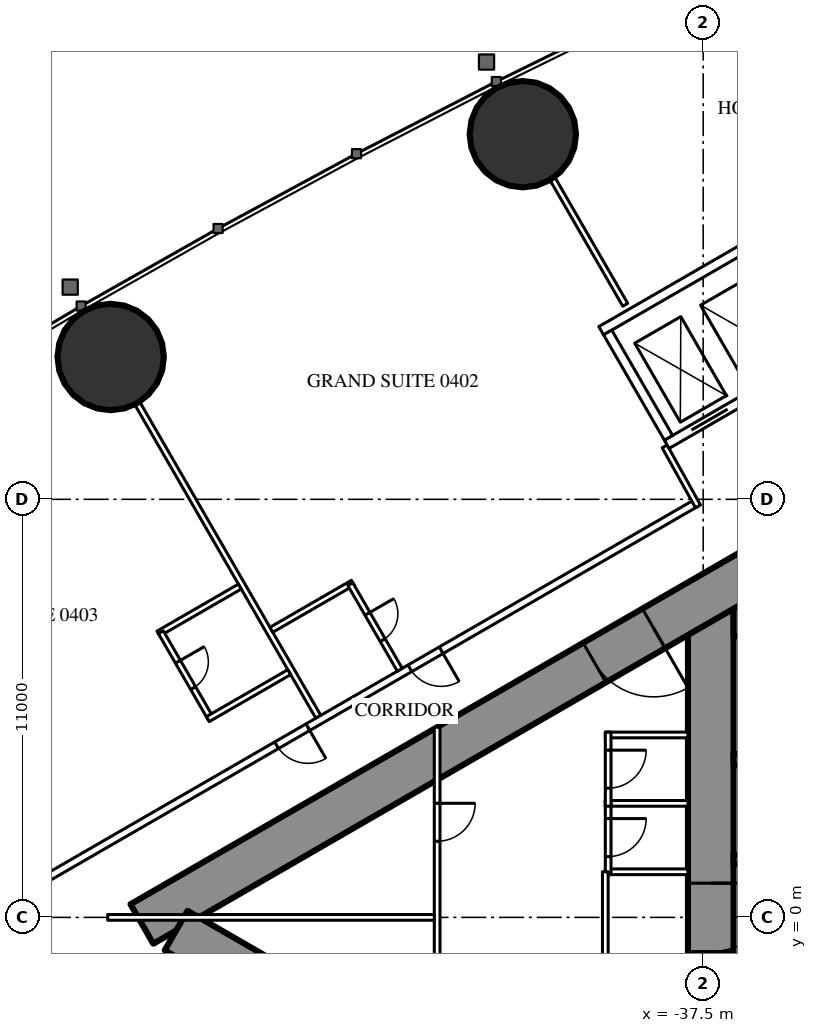
"""IFC4 building model, lengths in metres.
Left out: names, types, materials, properties, quantities, classifications, styles, units other than length and angle.
Written with IfcOpenShell. Run it as: python <this file> out.ifc"""

import sys

from ifc_helpers import new_model, si_unit, direction, frame, frame_2d, origin, origin_2d, place, context, subcontext, project, spatial, rectangle, hollow_circle, extrude, element, fill, save


model = new_model("IFC4")
c1 = context("Model", 3, precision=1e-05, world=origin(), true_north=direction((0.0, 1.0)))
c2 = subcontext(c1, "Body", "Model", "MODEL_VIEW")
j1 = project(units=[si_unit("LENGTHUNIT", "METRE"), si_unit("PLANEANGLEUNIT", "RADIAN")], contexts=[c1])
p1 = place(None, origin())
s1 = spatial("IfcSite", under=j1, at=p1, CompositionType="ELEMENT")
p2 = place(p1, origin())
s2 = spatial("IfcBuilding", under=s1, at=p2, CompositionType="ELEMENT")
p3 = place(p2, frame((0.0, 0.0, 21.5)))
s3 = spatial("IfcBuildingStorey", under=s2, at=p3, CompositionType="ELEMENT", Elevation=21.5)
for number, where, z_axis, x_axis in (
    (1, (-42.245, 20.607, 0.0), (0.0, 0.0, 1.0), (1.0, 0.0, 0.0)),
    (2, (-53.09, 14.745, 0.0), (0.0, 0.0, 1.0), (1.0, 0.0, 0.0)),
):
    element("IfcColumn", number, at=place(p3, frame(where, z_axis=z_axis, x_axis=x_axis)), inside=s3, PredefinedType="COLUMN", context=c2, shape_type="SweptSolid", body=[
        extrude(hollow_circle(Radius=1.4, WallThickness=0.12, at=origin_2d()), origin(), (0.0, 0.0, 1.0), 3.5),
    ])
p4 = place(p3, frame((-37.3, 8.6, 0.0), z_axis=(0.0, 0.0, 1.0), x_axis=(0.0, -1.0, 0.0)))
e3 = element("IfcWall", 3, at=p4, inside=s3, PredefinedType="SHEAR", context=c2, shape_type="SweptSolid", body=[
    extrude(rectangle(XDim=17.2, YDim=1.2, at=frame_2d((8.6, 0.0))), origin(), (0.0, 0.0, 1.0), 3.5),
])
p5 = place(p4, frame((7.7, 0.0, 0.0)))
e4 = element("IfcOpeningElement", 4, at=p5, cuts=e3, PredefinedType="OPENING", context=c2, shape_type="SweptSolid", body=[
    extrude(rectangle(XDim=1.8, YDim=2.2, at=frame_2d((0.9, 1.1))), frame((0.0, 0.61, 0.0), z_axis=(0.0, -1.0, 0.0), x_axis=(1.0, 0.0, 0.0)), (0.0, 0.0, 1.0), 1.22),
])
p6 = place(p3, frame((-28.3, 8.0, 0.0), z_axis=(0.0, 0.0, 1.0), x_axis=(-1.0, 0.0, 0.0)))
e5 = element("IfcWall", 5, at=p6, inside=s3, PredefinedType="SHEAR", context=c2, shape_type="SweptSolid", body=[
    extrude(rectangle(XDim=8.4, YDim=1.2, at=frame_2d((4.2, 0.0))), origin(), (0.0, 0.0, 1.0), 3.5),
])
p7 = place(p6, frame((0.25, 0.0, 0.0)))
e6 = element("IfcOpeningElement", 6, at=p7, cuts=e5, PredefinedType="OPENING", context=c2, shape_type="SweptSolid", body=[
    extrude(rectangle(XDim=1.0, YDim=2.2, at=frame_2d((0.5, 1.1))), frame((0.0, 0.61, 0.0), z_axis=(0.0, -1.0, 0.0), x_axis=(1.0, 0.0, 0.0)), (0.0, 0.0, 1.0), 1.22),
])
p8 = place(p3, frame((-28.3, 4.15, 0.0), z_axis=(0.0, 0.0, 1.0), x_axis=(-1.0, 0.0, 0.0)))
e7 = element("IfcWall", 7, at=p8, inside=s3, PredefinedType="SHEAR", context=c2, shape_type="SweptSolid", body=[
    extrude(rectangle(XDim=8.4, YDim=0.3, at=frame_2d((4.2, 0.0))), origin(), (0.0, 0.0, 1.0), 3.5),
])
p9 = place(p3, frame((-34.25, 1.525, 0.0), z_axis=(0.0, 0.0, 1.0), x_axis=(-1.0, 0.0, 0.0)))
e8 = element("IfcWall", 8, at=p9, inside=s3, PredefinedType="SHEAR", context=c2, shape_type="SweptSolid", body=[
    extrude(rectangle(XDim=2.45, YDim=0.25, at=frame_2d((1.225, 0.0))), origin(), (0.0, 0.0, 1.0), 3.5),
])
p10 = place(p3, frame((-27.2, 14.3, 0.0), z_axis=(0.0, 0.0, 1.0), x_axis=(-0.866026593062, -0.499997940104, 0.0)))
e9 = element("IfcWall", 9, at=p10, inside=s3, PredefinedType="SHEAR", context=c2, shape_type="SweptSolid", body=[
    extrude(rectangle(XDim=28.946, YDim=1.2, at=frame_2d((14.473, 0.0))), origin(), (0.0, 0.0, 1.0), 3.5),
])
p11 = place(p10, frame((4.6, 0.0, 0.0)))
e10 = element("IfcOpeningElement", 10, at=p11, cuts=e9, PredefinedType="OPENING", context=c2, shape_type="SweptSolid", body=[
    extrude(rectangle(XDim=1.0, YDim=2.2, at=frame_2d((0.5, 1.1))), frame((0.0, 0.61, 0.0), z_axis=(0.0, -1.0, 0.0), x_axis=(1.0, 0.0, 0.0)), (0.0, 0.0, 1.0), 1.22),
])
p12 = place(p10, frame((13.395, 0.0, 0.0)))
e11 = element("IfcOpeningElement", 11, at=p12, cuts=e9, PredefinedType="OPENING", context=c2, shape_type="SweptSolid", body=[
    extrude(rectangle(XDim=1.8, YDim=2.2, at=frame_2d((0.9, 1.1))), frame((0.0, 0.61, 0.0), z_axis=(0.0, -1.0, 0.0), x_axis=(1.0, 0.0, 0.0)), (0.0, 0.0, 1.0), 1.22),
])
p13 = place(p3, frame((-27.2, -14.3, 0.0), z_axis=(0.0, 0.0, 1.0), x_axis=(-0.866024021859, 0.500002393557, 0.0)))
e12 = element("IfcWall", 12, at=p13, inside=s3, PredefinedType="SHEAR", context=c2, shape_type="SweptSolid", body=[
    extrude(rectangle(XDim=27.907, YDim=1.2, at=frame_2d((13.954, 0.0))), origin(), (0.0, 0.0, 1.0), 3.5),
])
p14 = place(p13, frame((4.6, 0.0, 0.0)))
e13 = element("IfcOpeningElement", 13, at=p14, cuts=e12, PredefinedType="OPENING", context=c2, shape_type="SweptSolid", body=[
    extrude(rectangle(XDim=1.0, YDim=2.2, at=frame_2d((0.5, 1.1))), frame((0.0, 0.61, 0.0), z_axis=(0.0, -1.0, 0.0), x_axis=(1.0, 0.0, 0.0)), (0.0, 0.0, 1.0), 1.22),
])
p15 = place(p13, frame((13.395, 0.0, 0.0)))
e14 = element("IfcOpeningElement", 14, at=p15, cuts=e12, PredefinedType="OPENING", context=c2, shape_type="SweptSolid", body=[
    extrude(rectangle(XDim=1.8, YDim=2.2, at=frame_2d((0.9, 1.1))), frame((0.0, 0.61, 0.0), z_axis=(0.0, -1.0, 0.0), x_axis=(1.0, 0.0, 0.0)), (0.0, 0.0, 1.0), 1.22),
])
p16 = place(p3, frame((-47.627, 5.278, 0.0), z_axis=(0.0, 0.0, 1.0), x_axis=(-0.500009844318, 0.86601972009, 0.0)))
e15 = element("IfcWall", 15, at=p16, inside=s3, PredefinedType="PARTITIONING", context=c2, shape_type="SweptSolid", body=[
    extrude(rectangle(XDim=9.51, YDim=0.15, at=frame_2d((4.755, 0.0))), origin(), (0.0, 0.0, 1.0), 2.25),
])
p17 = place(p3, frame((-39.551, 16.119, 0.0), z_axis=(0.0, 0.0, 1.0), x_axis=(-0.500014214979, 0.866017196607, 0.0)))
e16 = element("IfcWall", 16, at=p17, inside=s3, PredefinedType="PARTITIONING", context=c2, shape_type="SweptSolid", body=[
    extrude(rectangle(XDim=3.815, YDim=0.15, at=frame_2d((1.907, 0.0))), origin(), (0.0, 0.0, 1.0), 3.25),
])
p18 = place(p3, frame((-37.7, 10.894, 0.0), z_axis=(0.0, 0.0, 1.0), x_axis=(-0.866027905338, -0.499995667157, 0.0)))
e17 = element("IfcWall", 17, at=p18, inside=s3, PredefinedType="PARTITIONING", context=c2, shape_type="SweptSolid", body=[
    extrude(rectangle(XDim=21.787, YDim=0.2, at=frame_2d((10.894, 0.0))), origin(), (0.0, 0.0, 1.0), 3.25),
])
p19 = place(p18, frame((11.78, 0.0, 0.0)))
e18 = element("IfcOpeningElement", 18, at=p19, cuts=e17, PredefinedType="OPENING", context=c2, shape_type="SweptSolid", body=[
    extrude(rectangle(XDim=0.95, YDim=2.2, at=frame_2d((0.475, 1.1))), frame((0.0, 0.11, 0.0), z_axis=(0.0, -1.0, 0.0), x_axis=(1.0, 0.0, 0.0)), (0.0, 0.0, 1.0), 0.22),
])
p20 = place(p18, frame((7.73, 0.0, 0.0)))
e19 = element("IfcOpeningElement", 19, at=p20, cuts=e17, PredefinedType="OPENING", context=c2, shape_type="SweptSolid", body=[
    extrude(rectangle(XDim=0.95, YDim=2.2, at=frame_2d((0.475, 1.1))), frame((0.0, 0.11, 0.0), z_axis=(0.0, -1.0, 0.0), x_axis=(1.0, 0.0, 0.0)), (0.0, 0.0, 1.0), 0.22),
])
p21 = place(p3, frame((-36.92, -11.344, 0.0), z_axis=(0.0, 0.0, 1.0), x_axis=(-0.866028313256, 0.499994960614, 0.0)))
e20 = element("IfcWall", 20, at=p21, inside=s3, PredefinedType="PARTITIONING", context=c2, shape_type="SweptSolid", body=[
    extrude(rectangle(XDim=22.568, YDim=0.2, at=frame_2d((11.284, 0.0))), origin(), (0.0, 0.0, 1.0), 3.25),
])
p22 = place(p21, frame((15.03, 0.0, 0.0)))
e21 = element("IfcOpeningElement", 21, at=p22, cuts=e20, PredefinedType="OPENING", context=c2, shape_type="SweptSolid", body=[
    extrude(rectangle(XDim=0.95, YDim=2.2, at=frame_2d((0.475, 1.1))), frame((0.0, 0.11, 0.0), z_axis=(0.0, -1.0, 0.0), x_axis=(1.0, 0.0, 0.0)), (0.0, 0.0, 1.0), 0.22),
])
p23 = place(p21, frame((3.35, 0.0, 0.0)))
e22 = element("IfcOpeningElement", 22, at=p23, cuts=e20, PredefinedType="OPENING", context=c2, shape_type="SweptSolid", body=[
    extrude(rectangle(XDim=1.0, YDim=2.2, at=frame_2d((0.5, 1.1))), frame((0.0, 0.11, 0.0), z_axis=(0.0, -1.0, 0.0), x_axis=(1.0, 0.0, 0.0)), (0.0, 0.0, 1.0), 0.22),
])
p24 = place(p3, frame((-38.513, 12.392, 0.0), z_axis=(0.0, 0.0, 1.0), x_axis=(0.485585508183, -0.874189175317, 0.0)))
e23 = element("IfcWall", 23, at=p24, inside=s3, PredefinedType="PARTITIONING", context=c2, shape_type="SweptSolid", body=[
    extrude(rectangle(XDim=1.805, YDim=0.15, at=frame_2d((0.902, 0.0))), origin(), (0.0, 0.0, 1.0), 3.25),
])
p25 = place(p3, frame((-49.692, 8.704, 0.0), z_axis=(0.0, 0.0, 1.0), x_axis=(-0.866073894602, -0.499916002032, 0.0)))
e24 = element("IfcWall", 24, at=p25, inside=s3, PredefinedType="PARTITIONING", context=c2, shape_type="SweptSolid", body=[
    extrude(rectangle(XDim=2.475, YDim=0.15, at=frame_2d((1.238, 0.0))), origin(), (0.0, 0.0, 1.0), 3.25),
])
p26 = place(p3, frame((-50.47, 5.253, 0.0), z_axis=(0.0, 0.0, 1.0), x_axis=(-0.500006934395, 0.866021400173, 0.0)))
e25 = element("IfcWall", 25, at=p26, inside=s3, PredefinedType="PARTITIONING", context=c2, shape_type="SweptSolid", body=[
    extrude(rectangle(XDim=2.6, YDim=0.15, at=frame_2d((1.3, 0.0))), origin(), (0.0, 0.0, 1.0), 3.25),
])
p27 = place(p26, frame((0.9, 0.0, 0.0)))
e26 = element("IfcOpeningElement", 26, at=p27, cuts=e25, PredefinedType="OPENING", context=c2, shape_type="SweptSolid", body=[
    extrude(rectangle(XDim=0.8, YDim=2.2, at=frame_2d((0.4, 1.1))), frame((0.0, 0.085, 0.0), z_axis=(0.0, -1.0, 0.0), x_axis=(1.0, 0.0, 0.0)), (0.0, 0.0, 1.0), 0.17),
])
for number, where, z_axis, x_axis in (
    (27, (-48.392, 6.453, 0.0), (0.0, 0.0, 1.0), (-0.866, -0.5, 0.0)),
    (28, (-46.719, 8.804, 0.0), (0.0, 0.0, 1.0), (-0.866, -0.5, 0.0)),
):
    element("IfcWall", number, at=place(p3, frame(where, z_axis=z_axis, x_axis=x_axis)), inside=s3, PredefinedType="PARTITIONING", context=c2, shape_type="SweptSolid", body=[
        extrude(rectangle(XDim=2.475, YDim=0.15, at=frame_2d((1.237, 0.0))), origin(), (0.0, 0.0, 1.0), 3.25),
    ])
p28 = place(p3, frame((-45.483, 6.515, 0.0), z_axis=(0.0, 0.0, 1.0), x_axis=(-0.500006934395, 0.866021400173, 0.0)))
e29 = element("IfcWall", 29, at=p28, inside=s3, PredefinedType="PARTITIONING", context=c2, shape_type="SweptSolid", body=[
    extrude(rectangle(XDim=2.6, YDim=0.15, at=frame_2d((1.3, 0.0))), origin(), (0.0, 0.0, 1.0), 3.25),
])
p29 = place(p28, frame((0.9, 0.0, 0.0)))
e30 = element("IfcOpeningElement", 30, at=p29, cuts=e29, PredefinedType="OPENING", context=c2, shape_type="SweptSolid", body=[
    extrude(rectangle(XDim=0.8, YDim=2.2, at=frame_2d((0.4, 1.1))), frame((0.0, 0.085, 0.0), z_axis=(0.0, -1.0, 0.0), x_axis=(1.0, 0.0, 0.0)), (0.0, 0.0, 1.0), 0.17),
])
for number, where, z_axis, x_axis in (
    (31, (-37.9, 1.2, 0.0), (0.0, 0.0, 1.0), (-1.0, 0.0, 0.0)),
    (32, (-37.9, 3.0, 0.0), (0.0, 0.0, 1.0), (-1.0, 0.0, 0.0)),
    (33, (-37.9, 4.8, 0.0), (0.0, 0.0, 1.0), (-1.0, 0.0, 0.0)),
):
    element("IfcWall", number, at=place(p3, frame(where, z_axis=z_axis, x_axis=x_axis)), inside=s3, PredefinedType="PARTITIONING", context=c2, shape_type="SweptSolid", body=[
        extrude(rectangle(XDim=2.175, YDim=0.15, at=frame_2d((1.087, 0.0))), origin(), (0.0, 0.0, 1.0), 3.25),
    ])
p30 = place(p3, frame((-40.0, 3.075, 0.0), z_axis=(0.0, 0.0, 1.0), x_axis=(0.0, -1.0, 0.0)))
e34 = element("IfcWall", 34, at=p30, inside=s3, PredefinedType="PARTITIONING", context=c2, shape_type="SweptSolid", body=[
    extrude(rectangle(XDim=1.95, YDim=0.15, at=frame_2d((0.975, 0.0))), origin(), (0.0, 0.0, 1.0), 3.25),
])
p31 = place(p30, frame((0.475, 0.0, 0.0)))
e35 = element("IfcOpeningElement", 35, at=p31, cuts=e34, PredefinedType="OPENING", context=c2, shape_type="SweptSolid", body=[
    extrude(rectangle(XDim=1.0, YDim=2.2, at=frame_2d((0.5, 1.1))), frame((0.0, 0.085, 0.0), z_axis=(0.0, -1.0, 0.0), x_axis=(1.0, 0.0, 0.0)), (0.0, 0.0, 1.0), 0.17),
])
p32 = place(p3, frame((-40.0, 4.875, 0.0), z_axis=(0.0, 0.0, 1.0), x_axis=(0.0, -1.0, 0.0)))
e36 = element("IfcWall", 36, at=p32, inside=s3, PredefinedType="PARTITIONING", context=c2, shape_type="SweptSolid", body=[
    extrude(rectangle(XDim=1.95, YDim=0.15, at=frame_2d((0.975, 0.0))), origin(), (0.0, 0.0, 1.0), 3.25),
])
p33 = place(p32, frame((0.475, 0.0, 0.0)))
e37 = element("IfcOpeningElement", 37, at=p33, cuts=e36, PredefinedType="OPENING", context=c2, shape_type="SweptSolid", body=[
    extrude(rectangle(XDim=1.0, YDim=2.2, at=frame_2d((0.5, 1.1))), frame((0.0, 0.085, 0.0), z_axis=(0.0, -1.0, 0.0), x_axis=(1.0, 0.0, 0.0)), (0.0, 0.0, 1.0), 0.17),
])
p34 = place(p3, frame((-40.075, 1.2, 0.0), z_axis=(0.0, 0.0, 1.0), x_axis=(0.0, -1.0, 0.0)))
e38 = element("IfcWall", 38, at=p34, inside=s3, PredefinedType="PARTITIONING", context=c2, shape_type="SweptSolid", body=[
    extrude(rectangle(XDim=7.374, YDim=0.15, at=frame_2d((3.687, 0.0))), origin(), (0.0, 0.0, 1.0), 3.25),
])
p35 = place(p34, frame((2.787, 0.0, 0.0)))
e39 = element("IfcOpeningElement", 39, at=p35, cuts=e38, PredefinedType="OPENING", context=c2, shape_type="SweptSolid", body=[
    extrude(rectangle(XDim=1.8, YDim=2.2, at=frame_2d((0.9, 1.1))), frame((0.0, 0.085, 0.0), z_axis=(0.0, -1.0, 0.0), x_axis=(1.0, 0.0, 0.0)), (0.0, 0.0, 1.0), 0.17),
])
p36 = place(p3, frame((-44.5, 5.005, 0.0), z_axis=(0.0, 0.0, 1.0), x_axis=(0.0, -1.0, 0.0)))
e40 = element("IfcWall", 40, at=p36, inside=s3, PredefinedType="PARTITIONING", context=c2, shape_type="SweptSolid", body=[
    extrude(rectangle(XDim=10.009, YDim=0.15, at=frame_2d((5.005, 0.0))), origin(), (0.0, 0.0, 1.0), 2.45),
])
p37 = place(p36, frame((2.002, 0.0, 0.0)))
e41 = element("IfcOpeningElement", 41, at=p37, cuts=e40, PredefinedType="OPENING", context=c2, shape_type="SweptSolid", body=[
    extrude(rectangle(XDim=1.0, YDim=2.2, at=frame_2d((0.5, 1.1))), frame((0.0, 0.085, 0.0), z_axis=(0.0, -1.0, 0.0), x_axis=(1.0, 0.0, 0.0)), (0.0, 0.0, 1.0), 0.17),
])
p38 = place(p36, frame((7.007, 0.0, 0.0)))
e42 = element("IfcOpeningElement", 42, at=p38, cuts=e40, PredefinedType="OPENING", context=c2, shape_type="SweptSolid", body=[
    extrude(rectangle(XDim=1.0, YDim=2.2, at=frame_2d((0.5, 1.1))), frame((0.0, 0.085, 0.0), z_axis=(0.0, -1.0, 0.0), x_axis=(1.0, 0.0, 0.0)), (0.0, 0.0, 1.0), 0.17),
])
p39 = place(p3, frame((-44.575, 0.0, 0.0), z_axis=(0.0, 0.0, 1.0), x_axis=(-1.0, 0.0, 0.0)))
e43 = element("IfcWall", 43, at=p39, inside=s3, PredefinedType="PARTITIONING", context=c2, shape_type="SweptSolid", body=[
    extrude(rectangle(XDim=8.593, YDim=0.15, at=frame_2d((4.297, 0.0))), origin(), (0.0, 0.0, 1.0), 2.25),
])
p40 = place(p3, frame((-31.01, 16.747, 0.0), z_axis=(0.0, 0.0, 1.0), x_axis=(-0.866028165386, -0.499995216735, 0.0)))
e44 = element("IfcWall", 44, at=p40, inside=s3, PredefinedType="PARTITIONING", context=c2, shape_type="SweptSolid", body=[
    extrude(rectangle(XDim=8.6, YDim=0.25, at=frame_2d((4.3, 0.0))), origin(), (0.0, 0.0, 1.0), 3.25),
])
p41 = place(p40, frame((0.75, 0.0, 0.0)))
e45 = element("IfcOpeningElement", 45, at=p41, cuts=e44, PredefinedType="OPENING", context=c2, shape_type="SweptSolid", body=[
    extrude(rectangle(XDim=1.1, YDim=2.2, at=frame_2d((0.55, 1.1))), frame((0.0, 0.135, 0.0), z_axis=(0.0, -1.0, 0.0), x_axis=(1.0, 0.0, 0.0)), (0.0, 0.0, 1.0), 0.27),
])
p42 = place(p40, frame((2.75, 0.0, 0.0)))
e46 = element("IfcOpeningElement", 46, at=p42, cuts=e44, PredefinedType="OPENING", context=c2, shape_type="SweptSolid", body=[
    extrude(rectangle(XDim=1.1, YDim=2.2, at=frame_2d((0.55, 1.1))), frame((0.0, 0.135, 0.0), z_axis=(0.0, -1.0, 0.0), x_axis=(1.0, 0.0, 0.0)), (0.0, 0.0, 1.0), 0.27),
])
p43 = place(p40, frame((4.75, 0.0, 0.0)))
e47 = element("IfcOpeningElement", 47, at=p43, cuts=e44, PredefinedType="OPENING", context=c2, shape_type="SweptSolid", body=[
    extrude(rectangle(XDim=1.1, YDim=2.2, at=frame_2d((0.55, 1.1))), frame((0.0, 0.135, 0.0), z_axis=(0.0, -1.0, 0.0), x_axis=(1.0, 0.0, 0.0)), (0.0, 0.0, 1.0), 0.27),
])
p44 = place(p40, frame((6.75, 0.0, 0.0)))
e48 = element("IfcOpeningElement", 48, at=p44, cuts=e44, PredefinedType="OPENING", context=c2, shape_type="SweptSolid", body=[
    extrude(rectangle(XDim=1.1, YDim=2.2, at=frame_2d((0.55, 1.1))), frame((0.0, 0.135, 0.0), z_axis=(0.0, -1.0, 0.0), x_axis=(1.0, 0.0, 0.0)), (0.0, 0.0, 1.0), 0.27),
])
p45 = place(p3, frame((-32.736, 19.736, 0.0), z_axis=(0.0, 0.0, 1.0), x_axis=(-0.866028165386, -0.499995216735, 0.0)))
e49 = element("IfcWall", 49, at=p45, inside=s3, PredefinedType="PARTITIONING", context=c2, shape_type="SweptSolid", body=[
    extrude(rectangle(XDim=8.6, YDim=0.25, at=frame_2d((4.3, 0.0))), origin(), (0.0, 0.0, 1.0), 3.25),
])
p46 = place(p3, frame((-38.413, 12.618, 0.0), z_axis=(0.0, 0.0, 1.0), x_axis=(-0.499872130319, 0.866099216793, 0.0)))
e50 = element("IfcWall", 50, at=p46, inside=s3, PredefinedType="PARTITIONING", context=c2, shape_type="SweptSolid", body=[
    extrude(rectangle(XDim=3.2, YDim=0.25, at=frame_2d((1.6, 0.0))), origin(), (0.0, 0.0, 1.0), 3.25),
])
p47 = place(p27, origin())
e51 = element("IfcDoor", 51, at=p47, inside=s3, OperationType="SINGLE_SWING_RIGHT", PredefinedType="DOOR", context=c2, shape_type="SweptSolid", body=[
    extrude(rectangle(XDim=0.8, YDim=2.2, at=frame_2d((0.4, 1.1))), frame((0.0, 0.025, 0.0), z_axis=(0.0, -1.0, 0.0), x_axis=(1.0, 0.0, 0.0)), (0.0, 0.0, 1.0), 0.05),
])
fill(e26, e51)
p48 = place(p19, origin())
e52 = element("IfcDoor", 52, at=p48, inside=s3, OperationType="SINGLE_SWING_LEFT", PredefinedType="DOOR", context=c2, shape_type="SweptSolid", body=[
    extrude(rectangle(XDim=0.95, YDim=2.2, at=frame_2d((0.475, 1.1))), frame((0.0, 0.025, 0.0), z_axis=(0.0, -1.0, 0.0), x_axis=(1.0, 0.0, 0.0)), (0.0, 0.0, 1.0), 0.05),
])
fill(e18, e52)
p49 = place(p29, origin())
e53 = element("IfcDoor", 53, at=p49, inside=s3, OperationType="SINGLE_SWING_RIGHT", PredefinedType="DOOR", context=c2, shape_type="SweptSolid", body=[
    extrude(rectangle(XDim=0.8, YDim=2.2, at=frame_2d((0.4, 1.1))), frame((0.0, 0.025, 0.0), z_axis=(0.0, -1.0, 0.0), x_axis=(1.0, 0.0, 0.0)), (0.0, 0.0, 1.0), 0.05),
])
fill(e30, e53)
p50 = place(p20, origin())
e54 = element("IfcDoor", 54, at=p50, inside=s3, OperationType="SINGLE_SWING_LEFT", PredefinedType="DOOR", context=c2, shape_type="SweptSolid", body=[
    extrude(rectangle(XDim=0.95, YDim=2.2, at=frame_2d((0.475, 1.1))), frame((0.0, 0.025, 0.0), z_axis=(0.0, -1.0, 0.0), x_axis=(1.0, 0.0, 0.0)), (0.0, 0.0, 1.0), 0.05),
])
fill(e19, e54)
p51 = place(p31, origin())
e55 = element("IfcDoor", 55, at=p51, inside=s3, OperationType="SINGLE_SWING_LEFT", PredefinedType="DOOR", context=c2, shape_type="SweptSolid", body=[
    extrude(rectangle(XDim=1.0, YDim=2.2, at=frame_2d((0.5, 1.1))), frame((0.0, 0.025, 0.0), z_axis=(0.0, -1.0, 0.0), x_axis=(1.0, 0.0, 0.0)), (0.0, 0.0, 1.0), 0.05),
])
fill(e35, e55)
p52 = place(p33, origin())
e56 = element("IfcDoor", 56, at=p52, inside=s3, OperationType="SINGLE_SWING_LEFT", PredefinedType="DOOR", context=c2, shape_type="SweptSolid", body=[
    extrude(rectangle(XDim=1.0, YDim=2.2, at=frame_2d((0.5, 1.1))), frame((0.0, 0.025, 0.0), z_axis=(0.0, -1.0, 0.0), x_axis=(1.0, 0.0, 0.0)), (0.0, 0.0, 1.0), 0.05),
])
fill(e37, e56)
p53 = place(p37, origin())
e57 = element("IfcDoor", 57, at=p53, inside=s3, OperationType="SINGLE_SWING_LEFT", PredefinedType="DOOR", context=c2, shape_type="SweptSolid", body=[
    extrude(rectangle(XDim=1.0, YDim=2.2, at=frame_2d((0.5, 1.1))), frame((0.0, 0.025, 0.0), z_axis=(0.0, -1.0, 0.0), x_axis=(1.0, 0.0, 0.0)), (0.0, 0.0, 1.0), 0.05),
])
fill(e41, e57)
p54 = place(p12, origin())
e58 = element("IfcDoor", 58, at=p54, inside=s3, OperationType="DOUBLE_DOOR_SINGLE_SWING", PredefinedType="DOOR", context=c2, shape_type="SweptSolid", body=[
    extrude(rectangle(XDim=1.8, YDim=2.2, at=frame_2d((0.9, 1.1))), frame((0.0, 0.025, 0.0), z_axis=(0.0, -1.0, 0.0), x_axis=(1.0, 0.0, 0.0)), (0.0, 0.0, 1.0), 0.05),
])
fill(e11, e58)
p55 = place(p5, origin())
e59 = element("IfcDoor", 59, at=p55, inside=s3, OperationType="DOUBLE_DOOR_SINGLE_SWING", PredefinedType="DOOR", context=c2, shape_type="SweptSolid", body=[
    extrude(rectangle(XDim=1.8, YDim=2.2, at=frame_2d((0.9, 1.1))), frame((0.0, 0.025, 0.0), z_axis=(0.0, -1.0, 0.0), x_axis=(1.0, 0.0, 0.0)), (0.0, 0.0, 1.0), 0.05),
])
fill(e4, e59)
p56 = place(p44, origin())
e60 = element("IfcDoor", 60, at=p56, inside=s3, OperationType="DOUBLE_DOOR_SLIDING", PredefinedType="USERDEFINED", context=c2, shape_type="SweptSolid", body=[
    extrude(rectangle(XDim=1.1, YDim=2.2, at=frame_2d((0.55, 1.1))), frame((0.0, 0.025, 0.0), z_axis=(0.0, -1.0, 0.0), x_axis=(1.0, 0.0, 0.0)), (0.0, 0.0, 1.0), 0.05),
])
fill(e48, e60)
save(model, sys.argv[1])
